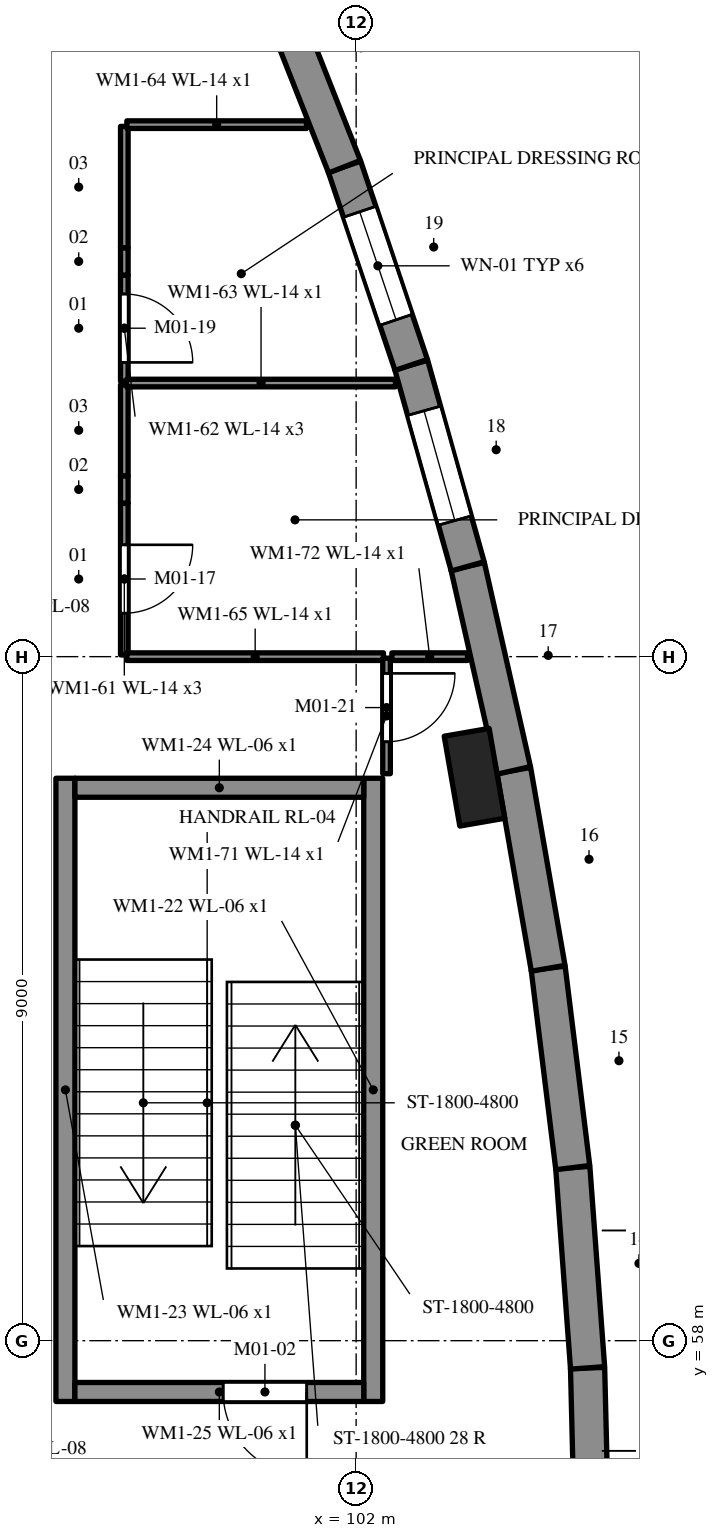
"""IFC4 building model, lengths in metres.
Left out: names, types, materials, properties, quantities, classifications, styles, units other than length and angle.
Written with IfcOpenShell. Run it as: python <this file> out.ifc"""

import sys

from ifc_helpers import new_model, si_unit, direction, frame, frame_2d, origin, origin_2d, place, context, subcontext, project, spatial, polyline, rectangle, outline, extrude, element, fill, save


model = new_model("IFC4")
c1 = context("Model", 3, precision=1e-05, world=origin(), true_north=direction((0.0, 1.0)))
c2 = subcontext(c1, "Body", "Model", "MODEL_VIEW")
j1 = project(units=[si_unit("LENGTHUNIT", "METRE"), si_unit("PLANEANGLEUNIT", "RADIAN")], contexts=[c1])
p1 = place(None, origin())
s1 = spatial("IfcSite", under=j1, at=p1, CompositionType="ELEMENT")
p2 = place(p1, origin())
s2 = spatial("IfcBuilding", under=s1, at=p2, CompositionType="ELEMENT")
p3 = place(p2, frame((0.0, 0.0, 5.4)))
s3 = spatial("IfcBuildingStorey", under=s2, at=p3, CompositionType="ELEMENT", Elevation=5.4)
p4 = place(p3, frame((105.11, 55.0, 0.0), z_axis=(0.0, 0.0, 1.0), x_axis=(-0.024666736886, 0.999695729756, 0.0)))
e1 = element("IfcWall", 1, at=p4, inside=s3, PredefinedType="SOLIDWALL", context=c2, shape_type="SweptSolid", body=[
    extrude(rectangle(XDim=2.643, YDim=0.45, at=frame_2d((1.321, 0.0))), origin(), (0.0, 0.0, 1.0), 4.8),
])
p5 = place(p3, frame((105.045, 57.642, 0.0), z_axis=(0.0, 0.0, 1.0), x_axis=(-0.07363685767, 0.997285121313, 0.0)))
e2 = element("IfcWall", 2, at=p5, inside=s3, PredefinedType="SOLIDWALL", context=c2, shape_type="SweptSolid", body=[
    extrude(rectangle(XDim=2.642, YDim=0.45, at=frame_2d((1.321, 0.0))), origin(), (0.0, 0.0, 1.0), 4.8),
])
p6 = place(p3, frame((104.85, 60.277, 0.0), z_axis=(0.0, 0.0, 1.0), x_axis=(-0.122499610212, 0.992468561466, 0.0)))
e3 = element("IfcWall", 3, at=p6, inside=s3, PredefinedType="SOLIDWALL", context=c2, shape_type="SweptSolid", body=[
    extrude(rectangle(XDim=2.643, YDim=0.45, at=frame_2d((1.321, 0.0))), origin(), (0.0, 0.0, 1.0), 4.8),
])
p7 = place(p3, frame((104.527, 62.9, 0.0), z_axis=(0.0, 0.0, 1.0), x_axis=(-0.171196910379, 0.985236833394, 0.0)))
e4 = element("IfcWall", 4, at=p7, inside=s3, PredefinedType="SOLIDWALL", context=c2, shape_type="SweptSolid", body=[
    extrude(rectangle(XDim=2.643, YDim=0.45, at=frame_2d((1.321, 0.0))), origin(), (0.0, 0.0, 1.0), 4.8),
])
p8 = place(p3, frame((104.074, 65.503, 0.0), z_axis=(0.0, 0.0, 1.0), x_axis=(-0.220347996563, 0.975421324562, 0.0)))
e5 = element("IfcWall", 5, at=p8, inside=s3, PredefinedType="SOLIDWALL", context=c2, shape_type="SweptSolid", body=[
    extrude(rectangle(XDim=2.752, YDim=0.45, at=frame_2d((1.376, 0.0))), origin(), (0.0, 0.0, 1.0), 4.8),
])
p9 = place(p3, frame((103.468, 68.188, 0.0), z_axis=(0.0, 0.0, 1.0), x_axis=(-0.270008269196, 0.962858003324, 0.0)))
e6 = element("IfcWall", 6, at=p9, inside=s3, PredefinedType="SOLIDWALL", context=c2, shape_type="SweptSolid", body=[
    extrude(rectangle(XDim=2.752, YDim=0.45, at=frame_2d((1.376, 0.0))), origin(), (0.0, 0.0, 1.0), 4.8),
])
p10 = place(p9, frame((0.626, 0.0, 0.9)))
e7 = element("IfcOpeningElement", 7, at=p10, cuts=e6, PredefinedType="OPENING", context=c2, shape_type="SweptSolid", body=[
    extrude(rectangle(XDim=1.5, YDim=2.1, at=frame_2d((0.75, 1.05))), frame((0.0, 0.235, 0.0), z_axis=(0.0, -1.0, 0.0), x_axis=(1.0, 0.0, 0.0)), (0.0, 0.0, 1.0), 0.47),
])
p11 = place(p3, frame((102.725, 70.838, 0.0), z_axis=(0.0, 0.0, 1.0), x_axis=(-0.318887614688, 0.947792534893, 0.0)))
e8 = element("IfcWall", 8, at=p11, inside=s3, PredefinedType="SOLIDWALL", context=c2, shape_type="SweptSolid", body=[
    extrude(rectangle(XDim=2.752, YDim=0.45, at=frame_2d((1.376, 0.0))), origin(), (0.0, 0.0, 1.0), 4.8),
])
p12 = place(p11, frame((0.626, 0.0, 0.9)))
e9 = element("IfcOpeningElement", 9, at=p12, cuts=e8, PredefinedType="OPENING", context=c2, shape_type="SweptSolid", body=[
    extrude(rectangle(XDim=1.5, YDim=2.1, at=frame_2d((0.75, 1.05))), frame((0.0, 0.235, 0.0), z_axis=(0.0, -1.0, 0.0), x_axis=(1.0, 0.0, 0.0)), (0.0, 0.0, 1.0), 0.47),
])
p13 = place(p3, frame((101.847, 73.447, 0.0), z_axis=(0.0, 0.0, 1.0), x_axis=(-0.366920100653, 0.930252460215, 0.0)))
e10 = element("IfcWall", 10, at=p13, inside=s3, PredefinedType="SOLIDWALL", context=c2, shape_type="SweptSolid", body=[
    extrude(rectangle(XDim=2.752, YDim=0.45, at=frame_2d((1.376, 0.0))), origin(), (0.0, 0.0, 1.0), 4.8),
])
p14 = place(p3, frame((103.557, 65.414, 0.0), z_axis=(0.0, 0.0, 1.0), x_axis=(-0.171172540003, 0.985241067734, 0.0)))
e11 = element("IfcColumn", 11, at=p14, inside=s3, PredefinedType="PILASTER", context=c2, shape_type="SweptSolid", body=[
    extrude(rectangle(XDim=1.2, YDim=0.6, at=origin_2d()), origin(), (0.0, 0.0, 1.0), 4.8),
])
for number, where, z_axis, x_axis in (
    (12, (102.225, 57.2, 0.0), (0.0, 0.0, 1.0), (0.0, 1.0, 0.0)),
    (13, (98.175, 65.4, 0.0), (0.0, 0.0, 1.0), (0.0, -1.0, 0.0)),
):
    element("IfcWall", number, at=place(p3, frame(where, z_axis=z_axis, x_axis=x_axis)), inside=s3, PredefinedType="SHEAR", context=c2, shape_type="SweptSolid", body=[
        extrude(rectangle(XDim=8.2, YDim=0.25, at=frame_2d((4.1, 0.0))), origin(), (0.0, 0.0, 1.0), 4.8),
    ])
p15 = place(p3, frame((98.3, 65.275, 0.0), z_axis=(0.0, 0.0, 1.0), x_axis=(1.0, 0.0, 0.0)))
e14 = element("IfcWall", 14, at=p15, inside=s3, PredefinedType="SHEAR", context=c2, shape_type="SweptSolid", body=[
    extrude(rectangle(XDim=3.8, YDim=0.25, at=frame_2d((1.9, 0.0))), origin(), (0.0, 0.0, 1.0), 4.8),
])
p16 = place(p3, frame((102.1, 57.325, 0.0), z_axis=(0.0, 0.0, 1.0), x_axis=(-1.0, 0.0, 0.0)))
e15 = element("IfcWall", 15, at=p16, inside=s3, PredefinedType="SHEAR", context=c2, shape_type="SweptSolid", body=[
    extrude(rectangle(XDim=3.8, YDim=0.25, at=frame_2d((1.9, 0.0))), origin(), (0.0, 0.0, 1.0), 4.8),
])
p17 = place(p16, frame((0.75, 0.0, 0.0)))
e16 = element("IfcOpeningElement", 16, at=p17, cuts=e15, PredefinedType="OPENING", context=c2, shape_type="SweptSolid", body=[
    extrude(rectangle(XDim=1.1, YDim=2.1, at=frame_2d((0.55, 1.05))), frame((0.0, 0.135, 0.0), z_axis=(0.0, -1.0, 0.0), x_axis=(1.0, 0.0, 0.0)), (0.0, 0.0, 1.0), 0.27),
])
p18 = place(p3, frame((98.95, 67.023, 0.0), z_axis=(0.0, 0.0, 1.0), x_axis=(0.0, 1.0, 0.0)))
e17 = element("IfcWall", 17, at=p18, inside=s3, PredefinedType="PARTITIONING", context=c2, shape_type="SweptSolid", body=[
    extrude(rectangle(XDim=1.997, YDim=0.1, at=frame_2d((0.999, 0.0))), origin(), (0.0, 0.0, 1.0), 4.55),
])
p19 = place(p18, frame((0.549, 0.0, 0.0)))
e18 = element("IfcOpeningElement", 18, at=p19, cuts=e17, PredefinedType="OPENING", context=c2, shape_type="SweptSolid", body=[
    extrude(rectangle(XDim=0.9, YDim=2.1, at=frame_2d((0.45, 1.05))), frame((0.0, 0.06, 0.0), z_axis=(0.0, -1.0, 0.0), x_axis=(1.0, 0.0, 0.0)), (0.0, 0.0, 1.0), 0.12),
])
p20 = place(p3, frame((98.95, 69.02, 0.0), z_axis=(0.0, 0.0, 1.0), x_axis=(0.0, 1.0, 0.0)))
e19 = element("IfcWall", 19, at=p20, inside=s3, PredefinedType="PARTITIONING", context=c2, shape_type="SweptSolid", body=[
    extrude(rectangle(XDim=0.36, YDim=0.1, at=frame_2d((0.18, 0.0))), origin(), (0.0, 0.0, 1.0), 3.92),
])
p21 = place(p3, frame((98.95, 69.38, 0.0), z_axis=(0.0, 0.0, 1.0), x_axis=(0.0, 1.0, 0.0)))
e20 = element("IfcWall", 20, at=p21, inside=s3, PredefinedType="PARTITIONING", context=c2, shape_type="SweptSolid", body=[
    extrude(rectangle(XDim=1.197, YDim=0.1, at=frame_2d((0.599, 0.0))), origin(), (0.0, 0.0, 1.0), 4.55),
])
p22 = place(p3, frame((98.95, 70.623, 0.0), z_axis=(0.0, 0.0, 1.0), x_axis=(0.0, 1.0, 0.0)))
e21 = element("IfcWall", 21, at=p22, inside=s3, PredefinedType="PARTITIONING", context=c2, shape_type="SweptSolid", body=[
    extrude(rectangle(XDim=1.397, YDim=0.1, at=frame_2d((0.698, 0.0))), origin(), (0.0, 0.0, 1.0), 4.55),
])
p23 = place(p22, frame((0.249, 0.0, 0.0)))
e22 = element("IfcOpeningElement", 22, at=p23, cuts=e21, PredefinedType="OPENING", context=c2, shape_type="SweptSolid", body=[
    extrude(rectangle(XDim=0.9, YDim=2.1, at=frame_2d((0.45, 1.05))), frame((0.0, 0.06, 0.0), z_axis=(0.0, -1.0, 0.0), x_axis=(1.0, 0.0, 0.0)), (0.0, 0.0, 1.0), 0.12),
])
p24 = place(p3, frame((98.95, 72.02, 0.0), z_axis=(0.0, 0.0, 1.0), x_axis=(0.0, 1.0, 0.0)))
e23 = element("IfcWall", 23, at=p24, inside=s3, PredefinedType="PARTITIONING", context=c2, shape_type="SweptSolid", body=[
    extrude(rectangle(XDim=0.36, YDim=0.1, at=frame_2d((0.18, 0.0))), origin(), (0.0, 0.0, 1.0), 3.92),
])
p25 = place(p3, frame((98.95, 72.38, 0.0), z_axis=(0.0, 0.0, 1.0), x_axis=(0.0, 1.0, 0.0)))
e24 = element("IfcWall", 24, at=p25, inside=s3, PredefinedType="PARTITIONING", context=c2, shape_type="SweptSolid", body=[
    extrude(rectangle(XDim=1.597, YDim=0.1, at=frame_2d((0.798, 0.0))), origin(), (0.0, 0.0, 1.0), 4.55),
])
p26 = place(p3, frame((98.98, 70.6, 0.0), z_axis=(0.0, 0.0, 1.0), x_axis=(1.0, 0.0, 0.0)))
e25 = element("IfcWall", 25, at=p26, inside=s3, PredefinedType="PARTITIONING", context=c2, shape_type="SweptSolid", body=[
    extrude(rectangle(XDim=3.538, YDim=0.1, at=frame_2d((1.769, 0.0))), origin(), (0.0, 0.0, 1.0), 4.55),
])
p27 = place(p3, frame((98.983, 74.0, 0.0), z_axis=(0.0, 0.0, 1.0), x_axis=(1.0, 0.0, 0.0)))
e26 = element("IfcWall", 26, at=p27, inside=s3, PredefinedType="PARTITIONING", context=c2, shape_type="SweptSolid", body=[
    extrude(rectangle(XDim=2.364, YDim=0.1, at=frame_2d((1.182, 0.0))), origin(), (0.0, 0.0, 1.0), 4.55),
])
p28 = place(p3, frame((102.36, 67.0, 0.0), z_axis=(0.0, 0.0, 1.0), x_axis=(-1.0, 0.0, 0.0)))
e27 = element("IfcWall", 27, at=p28, inside=s3, PredefinedType="PARTITIONING", context=c2, shape_type="SweptSolid", body=[
    extrude(rectangle(XDim=3.377, YDim=0.1, at=frame_2d((1.688, 0.0))), origin(), (0.0, 0.0, 1.0), 4.55),
])
p29 = place(p3, frame((102.4, 65.46, 0.0), z_axis=(0.0, 0.0, 1.0), x_axis=(0.0, 1.0, 0.0)))
e28 = element("IfcWall", 28, at=p29, inside=s3, PredefinedType="PARTITIONING", context=c2, shape_type="SweptSolid", body=[
    extrude(outline(polyline([(0.0, 0.0), (1.52, 0.0), (1.52, 4.55), (0.947, 4.55), (0.945, 3.82), (0.535, 3.82), (0.533, 4.55), (0.0, 4.55), (0.0, 0.0)])), frame((0.0, 0.05, 0.0), z_axis=(0.0, -1.0, 0.0), x_axis=(1.0, 0.0, 0.0)), (0.0, 0.0, 1.0), 0.1),
])
p30 = place(p29, frame((0.42, 0.0, 0.0)))
e29 = element("IfcOpeningElement", 29, at=p30, cuts=e28, PredefinedType="OPENING", context=c2, shape_type="SweptSolid", body=[
    extrude(rectangle(XDim=0.9, YDim=2.1, at=frame_2d((0.45, 1.05))), frame((0.0, 0.06, 0.0), z_axis=(0.0, -1.0, 0.0), x_axis=(1.0, 0.0, 0.0)), (0.0, 0.0, 1.0), 0.12),
])
p31 = place(p3, frame((103.465, 67.0, 0.0), z_axis=(0.0, 0.0, 1.0), x_axis=(-1.0, 0.0, 0.0)))
e30 = element("IfcWall", 30, at=p31, inside=s3, PredefinedType="PARTITIONING", context=c2, shape_type="SweptSolid", body=[
    extrude(rectangle(XDim=0.995, YDim=0.1, at=frame_2d((0.498, 0.0))), origin(), (0.0, 0.0, 1.0), 4.55),
])
p32 = place(p17, origin())
e31 = element("IfcDoor", 31, at=p32, inside=s3, OperationType="SINGLE_SWING_LEFT", PredefinedType="DOOR", context=c2, shape_type="SweptSolid", body=[
    extrude(rectangle(XDim=1.1, YDim=2.1, at=frame_2d((0.55, 1.05))), frame((0.0, 0.025, 0.0), z_axis=(0.0, -1.0, 0.0), x_axis=(1.0, 0.0, 0.0)), (0.0, 0.0, 1.0), 0.05),
])
fill(e16, e31)
p33 = place(p10, origin())
e32 = element("IfcWindow", 32, at=p33, inside=s3, PartitioningType="SINGLE_PANEL", PredefinedType="WINDOW", context=c2, shape_type="SweptSolid", body=[
    extrude(rectangle(XDim=1.5, YDim=2.1, at=frame_2d((0.75, 1.05))), frame((0.0, 0.03, 0.0), z_axis=(0.0, -1.0, 0.0), x_axis=(1.0, 0.0, 0.0)), (0.0, 0.0, 1.0), 0.06),
])
fill(e7, e32)
p34 = place(p12, origin())
e33 = element("IfcWindow", 33, at=p34, inside=s3, PartitioningType="SINGLE_PANEL", PredefinedType="WINDOW", context=c2, shape_type="SweptSolid", body=[
    extrude(rectangle(XDim=1.5, YDim=2.1, at=frame_2d((0.75, 1.05))), frame((0.0, 0.03, 0.0), z_axis=(0.0, -1.0, 0.0), x_axis=(1.0, 0.0, 0.0)), (0.0, 0.0, 1.0), 0.06),
])
fill(e9, e33)
p35 = place(p19, frame((0.9, 0.0, 0.0), z_axis=(0.0, 0.0, 1.0), x_axis=(-1.0, 0.0, 0.0)))
e34 = element("IfcDoor", 34, at=p35, inside=s3, OperationType="SINGLE_SWING_LEFT", PredefinedType="DOOR", context=c2, shape_type="SweptSolid", body=[
    extrude(rectangle(XDim=0.9, YDim=2.1, at=frame_2d((0.45, 1.05))), frame((0.0, 0.025, 0.0), z_axis=(0.0, -1.0, 0.0), x_axis=(1.0, 0.0, 0.0)), (0.0, 0.0, 1.0), 0.05),
])
fill(e18, e34)
p36 = place(p23, frame((0.9, 0.0, 0.0), z_axis=(0.0, 0.0, 1.0), x_axis=(-1.0, 0.0, 0.0)))
e35 = element("IfcDoor", 35, at=p36, inside=s3, OperationType="SINGLE_SWING_RIGHT", PredefinedType="DOOR", context=c2, shape_type="SweptSolid", body=[
    extrude(rectangle(XDim=0.9, YDim=2.1, at=frame_2d((0.45, 1.05))), frame((0.0, 0.025, 0.0), z_axis=(0.0, -1.0, 0.0), x_axis=(1.0, 0.0, 0.0)), (0.0, 0.0, 1.0), 0.05),
])
fill(e22, e35)
p37 = place(p30, frame((0.9, 0.0, 0.0), z_axis=(0.0, 0.0, 1.0), x_axis=(-1.0, 0.0, 0.0)))
e36 = element("IfcDoor", 36, at=p37, inside=s3, OperationType="SINGLE_SWING_LEFT", PredefinedType="DOOR", context=c2, shape_type="SweptSolid", body=[
    extrude(rectangle(XDim=0.9, YDim=2.1, at=frame_2d((0.45, 1.05))), frame((0.0, 0.025, 0.0), z_axis=(0.0, -1.0, 0.0), x_axis=(1.0, 0.0, 0.0)), (0.0, 0.0, 1.0), 0.05),
])
fill(e29, e36)
save(model, sys.argv[1])
